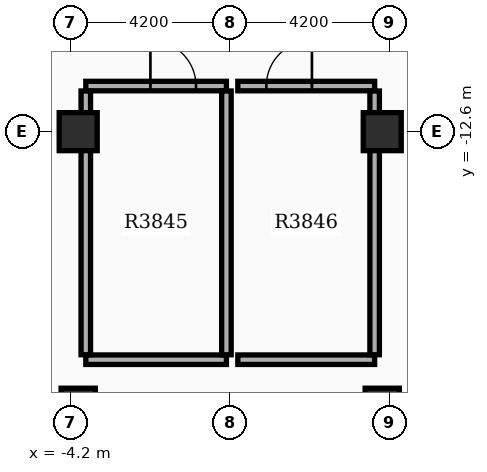
"""IFC4 building model, lengths in metres.
Left out: names, types, materials, properties, quantities, classifications, styles, units other than length and angle.
Written with IfcOpenShell. Run it as: python <this file> out.ifc"""

import sys

from ifc_helpers import new_model, si_unit, direction, frame, frame_2d, origin, origin_2d, place, context, subcontext, project, spatial, rectangle, extrude, element, fill, save


model = new_model("IFC4")
c1 = context("Model", 3, precision=1e-05, world=origin(), true_north=direction((0.0, 1.0)))
c2 = subcontext(c1, "Body", "Model", "MODEL_VIEW")
j1 = project(units=[si_unit("LENGTHUNIT", "METRE"), si_unit("PLANEANGLEUNIT", "RADIAN")], contexts=[c1])
p1 = place(None, origin())
s1 = spatial("IfcSite", under=j1, at=p1, CompositionType="ELEMENT")
p2 = place(p1, origin())
s2 = spatial("IfcBuilding", under=s1, at=p2, CompositionType="ELEMENT")
p3 = place(p2, frame((0.0, 0.0, 240.3)))
s3 = spatial("IfcBuildingStorey", under=s2, at=p3, CompositionType="ELEMENT", Elevation=240.3)
for number, where, z_axis, x_axis in (
    (1, (-4.0, -12.6, 0.0), (0.0, 0.0, 1.0), (1.0, 0.0, 0.0)),
    (2, (4.0, -12.6, 0.0), (0.0, 0.0, 1.0), (1.0, 0.0, 0.0)),
):
    element("IfcColumn", number, at=place(p3, frame(where, z_axis=z_axis, x_axis=x_axis)), inside=s3, PredefinedType="COLUMN", context=c2, shape_type="SweptSolid", body=[
        extrude(rectangle(XDim=1.0, YDim=1.0, at=origin_2d()), origin(), (0.0, 0.0, 1.0), 5.1),
    ])
for number, where, z_axis, x_axis in (
    (3, (-4.0, -19.8, 0.0), (0.0, 0.0, 1.0), (1.0, 0.0, 0.0)),
    (4, (4.0, -19.8, 0.0), (0.0, 0.0, 1.0), (1.0, 0.0, 0.0)),
):
    element("IfcColumn", number, at=place(p3, frame(where, z_axis=z_axis, x_axis=x_axis)), inside=s3, PredefinedType="COLUMN", context=c2, shape_type="SweptSolid", body=[
        extrude(rectangle(XDim=0.9, YDim=0.9, at=origin_2d()), origin(), (0.0, 0.0, 1.0), 5.1),
    ])
p4 = place(p3, frame((-3.8, -18.6, 0.0), z_axis=(0.0, 0.0, 1.0), x_axis=(1.0, 0.0, 0.0)))
e5 = element("IfcWall", 5, at=p4, inside=s3, PredefinedType="SOLIDWALL", context=c2, shape_type="SweptSolid", body=[
    extrude(rectangle(XDim=3.7, YDim=0.25, at=frame_2d((1.85, 0.0))), origin(), (0.0, 0.0, 1.0), 3.92),
])
p5 = place(p3, frame((-3.8, -11.4, 0.0), z_axis=(0.0, 0.0, 1.0), x_axis=(1.0, 0.0, 0.0)))
e6 = element("IfcWall", 6, at=p5, inside=s3, PredefinedType="SOLIDWALL", context=c2, shape_type="SweptSolid", body=[
    extrude(rectangle(XDim=3.7, YDim=0.25, at=frame_2d((1.85, 0.0))), origin(), (0.0, 0.0, 1.0), 3.92),
])
p6 = place(p5, frame((1.7, 0.0, 0.0)))
e7 = element("IfcOpeningElement", 7, at=p6, cuts=e6, PredefinedType="OPENING", context=c2, shape_type="SweptSolid", body=[
    extrude(rectangle(XDim=1.2, YDim=2.15, at=frame_2d((0.6, 1.075))), frame((0.0, 0.135, 0.0), z_axis=(0.0, -1.0, 0.0), x_axis=(1.0, 0.0, 0.0)), (0.0, 0.0, 1.0), 0.27),
])
for number, where, z_axis, x_axis in (
    (8, (-3.8, -18.47, 0.0), (0.0, 0.0, 1.0), (0.0, 1.0, 0.0)),
    (9, (-0.1, -18.47, 0.0), (0.0, 0.0, 1.0), (0.0, 1.0, 0.0)),
):
    element("IfcWall", number, at=place(p3, frame(where, z_axis=z_axis, x_axis=x_axis)), inside=s3, PredefinedType="SOLIDWALL", context=c2, shape_type="SweptSolid", body=[
        extrude(rectangle(XDim=6.94, YDim=0.25, at=frame_2d((3.47, 0.0))), origin(), (0.0, 0.0, 1.0), 3.92),
    ])
p7 = place(p3, frame((0.2, -18.6, 0.0), z_axis=(0.0, 0.0, 1.0), x_axis=(1.0, 0.0, 0.0)))
e10 = element("IfcWall", 10, at=p7, inside=s3, PredefinedType="SOLIDWALL", context=c2, shape_type="SweptSolid", body=[
    extrude(rectangle(XDim=3.6, YDim=0.25, at=frame_2d((1.8, 0.0))), origin(), (0.0, 0.0, 1.0), 3.92),
])
p8 = place(p3, frame((0.2, -11.4, 0.0), z_axis=(0.0, 0.0, 1.0), x_axis=(1.0, 0.0, 0.0)))
e11 = element("IfcWall", 11, at=p8, inside=s3, PredefinedType="SOLIDWALL", context=c2, shape_type="SweptSolid", body=[
    extrude(rectangle(XDim=3.6, YDim=0.25, at=frame_2d((1.8, 0.0))), origin(), (0.0, 0.0, 1.0), 3.92),
])
p9 = place(p8, frame((0.75, 0.0, 0.0)))
e12 = element("IfcOpeningElement", 12, at=p9, cuts=e11, PredefinedType="OPENING", context=c2, shape_type="SweptSolid", body=[
    extrude(rectangle(XDim=1.2, YDim=2.15, at=frame_2d((0.6, 1.075))), frame((0.0, 0.135, 0.0), z_axis=(0.0, -1.0, 0.0), x_axis=(1.0, 0.0, 0.0)), (0.0, 0.0, 1.0), 0.27),
])
p10 = place(p3, frame((3.8, -18.47, 0.0), z_axis=(0.0, 0.0, 1.0), x_axis=(0.0, 1.0, 0.0)))
e13 = element("IfcWall", 13, at=p10, inside=s3, PredefinedType="SOLIDWALL", context=c2, shape_type="SweptSolid", body=[
    extrude(rectangle(XDim=6.94, YDim=0.25, at=frame_2d((3.47, 0.0))), origin(), (0.0, 0.0, 1.0), 3.92),
])
p11 = place(p6, origin())
e14 = element("IfcDoor", 14, at=p11, inside=s3, OperationType="SINGLE_SWING_LEFT", PredefinedType="DOOR", context=c2, shape_type="SweptSolid", body=[
    extrude(rectangle(XDim=1.2, YDim=2.15, at=frame_2d((0.6, 1.075))), frame((0.0, 0.025, 0.0), z_axis=(0.0, -1.0, 0.0), x_axis=(1.0, 0.0, 0.0)), (0.0, 0.0, 1.0), 0.05),
])
fill(e7, e14)
p12 = place(p9, origin())
e15 = element("IfcDoor", 15, at=p12, inside=s3, OperationType="SINGLE_SWING_RIGHT", PredefinedType="DOOR", context=c2, shape_type="SweptSolid", body=[
    extrude(rectangle(XDim=1.2, YDim=2.15, at=frame_2d((0.6, 1.075))), frame((0.0, 0.025, 0.0), z_axis=(0.0, -1.0, 0.0), x_axis=(1.0, 0.0, 0.0)), (0.0, 0.0, 1.0), 0.05),
])
fill(e12, e15)
save(model, sys.argv[1])
